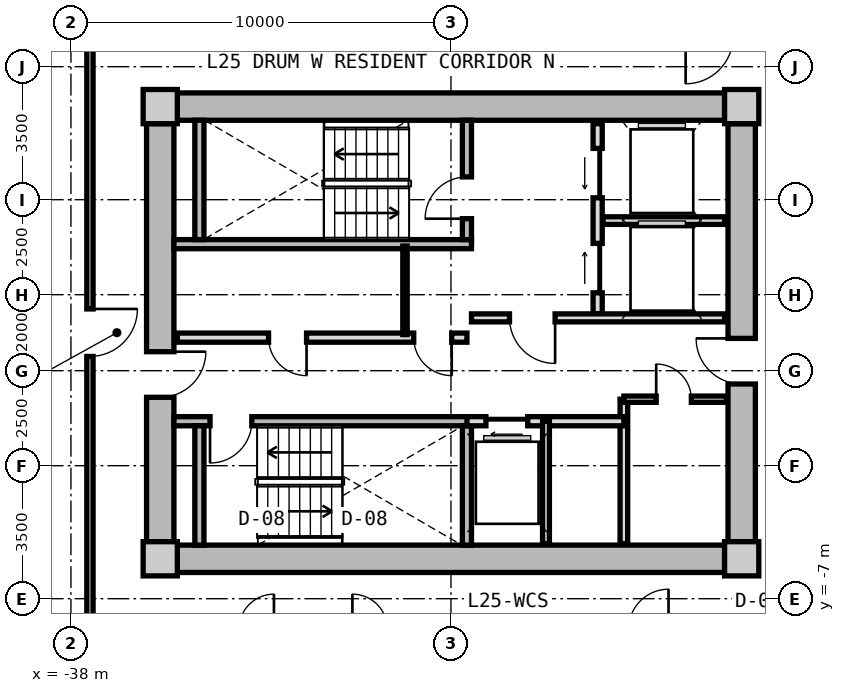
"""IFC4 building model, lengths in metres.
Left out: names, types, materials, properties, quantities, classifications, styles, units other than length and angle.
Written with IfcOpenShell. Run it as: python <this file> out.ifc"""

import sys

from ifc_helpers import new_model, si_unit, direction, frame, frame_2d, origin, origin_2d, place, context, subcontext, project, spatial, rectangle, extrude, source, transform, mapped, element, fill, save


model = new_model("IFC4")
c1 = context("Model", 3, precision=1e-05, world=origin(), true_north=direction((0.0, 1.0)))
c2 = subcontext(c1, "Body", "Model", "MODEL_VIEW")
j1 = project(units=[si_unit("LENGTHUNIT", "METRE"), si_unit("PLANEANGLEUNIT", "RADIAN")], contexts=[c1])
p1 = place(None, origin())
s1 = spatial("IfcSite", under=j1, at=p1, CompositionType="ELEMENT")
p2 = place(p1, origin())
s2 = spatial("IfcBuilding", under=s1, at=p2, CompositionType="ELEMENT")
p3 = place(p2, frame((0.0, 0.0, 84.05)))
s3 = spatial("IfcBuildingStorey", under=s2, at=p3, CompositionType="ELEMENT", Elevation=84.05)
m1 = source(origin(), c2, "Body", "SweptSolid", [
    extrude(rectangle(XDim=0.9, YDim=0.9, at=origin_2d()), origin(), (0.0, 0.0, 1.0), 3.05),
])
for number, where, z_axis, x_axis in (
    (1, (-35.65, -5.95, 0.0), (0.0, 0.0, 1.0), (1.0, 0.0, 0.0)),
    (2, (-20.35, -5.95, 0.0), (0.0, 0.0, 1.0), (1.0, 0.0, 0.0)),
    (3, (-20.35, 5.95, 0.0), (0.0, 0.0, 1.0), (1.0, 0.0, 0.0)),
    (4, (-35.65, 5.95, 0.0), (0.0, 0.0, 1.0), (1.0, 0.0, 0.0)),
):
    element("IfcColumn", number, at=place(p3, frame(where, z_axis=z_axis, x_axis=x_axis)), inside=s3, PredefinedType="COLUMN", context=c2, shape_type="MappedRepresentation", body=[
        mapped(m1, transform((0.0, 0.0, 0.0), x_axis=(1.0, 0.0, 0.0), y_axis=(0.0, 1.0, 0.0), z_axis=(0.0, 0.0, 1.0), scale=1.0)),
    ])
m2 = source(origin(), c2, "Body", "SweptSolid", [
    extrude(rectangle(XDim=14.4, YDim=0.72, at=frame_2d((7.2, 0.0))), origin(), (0.0, 0.0, 1.0), 2.79),
])
for number, where, z_axis, x_axis in (
    (5, (-35.2, 5.95, 0.0), (0.0, 0.0, 1.0), (1.0, 0.0, 0.0)),
    (6, (-20.8, -5.95, 0.0), (0.0, 0.0, 1.0), (-1.0, 0.0, 0.0)),
):
    element("IfcWall", number, at=place(p3, frame(where, z_axis=z_axis, x_axis=x_axis)), inside=s3, PredefinedType="SHEAR", context=c2, shape_type="MappedRepresentation", body=[
        mapped(m2, transform((0.0, 0.0, 0.0), x_axis=(1.0, 0.0, 0.0), y_axis=(0.0, 1.0, 0.0), z_axis=(0.0, 0.0, 1.0), scale=1.0)),
    ])
m3 = source(origin(), c2, "Body", "SweptSolid", [
    extrude(rectangle(XDim=11.0, YDim=0.72, at=frame_2d((5.5, 0.0))), origin(), (0.0, 0.0, 1.0), 2.79),
])
p4 = place(p3, frame((-35.65, -5.5, 0.0), z_axis=(0.0, 0.0, 1.0), x_axis=(0.0, 1.0, 0.0)))
e7 = element("IfcWall", 7, at=p4, inside=s3, PredefinedType="SHEAR", context=c2, shape_type="MappedRepresentation", body=[
    mapped(m3, transform((0.0, 0.0, 0.0), x_axis=(1.0, 0.0, 0.0), y_axis=(0.0, 1.0, 0.0), z_axis=(0.0, 0.0, 1.0), scale=1.0)),
])
p5 = place(p4, frame((3.8, 0.0, 0.0)))
e8 = element("IfcOpeningElement", 8, at=p5, cuts=e7, PredefinedType="OPENING", context=c2, shape_type="SweptSolid", body=[
    extrude(rectangle(XDim=1.2, YDim=2.15, at=frame_2d((0.6, 1.075))), frame((0.0, 0.37, 0.0), z_axis=(0.0, -1.0, 0.0), x_axis=(1.0, 0.0, 0.0)), (0.0, 0.0, 1.0), 0.74),
])
p6 = place(p3, frame((-20.35, 5.5, 0.0), z_axis=(0.0, 0.0, 1.0), x_axis=(0.0, -1.0, 0.0)))
e9 = element("IfcWall", 9, at=p6, inside=s3, PredefinedType="SHEAR", context=c2, shape_type="MappedRepresentation", body=[
    mapped(m3, transform((0.0, 0.0, 0.0), x_axis=(1.0, 0.0, 0.0), y_axis=(0.0, 1.0, 0.0), z_axis=(0.0, 0.0, 1.0), scale=1.0)),
])
p7 = place(p6, frame((5.65, 0.0, 0.0)))
e10 = element("IfcOpeningElement", 10, at=p7, cuts=e9, PredefinedType="OPENING", context=c2, shape_type="SweptSolid", body=[
    extrude(rectangle(XDim=1.2, YDim=2.15, at=frame_2d((0.6, 1.075))), frame((0.0, 0.37, 0.0), z_axis=(0.0, -1.0, 0.0), x_axis=(1.0, 0.0, 0.0)), (0.0, 0.0, 1.0), 0.74),
])
m4 = source(origin(), c2, "Body", "SweptSolid", [
    extrude(rectangle(XDim=7.83, YDim=0.24, at=frame_2d((3.915, 0.0))), origin(), (0.0, 0.0, 1.0), 2.79),
])
p8 = place(p3, frame((-35.29, 2.33, 0.0), z_axis=(0.0, 0.0, 1.0), x_axis=(1.0, 0.0, 0.0)))
e11 = element("IfcWall", 11, at=p8, inside=s3, PredefinedType="PARTITIONING", context=c2, shape_type="MappedRepresentation", body=[
    mapped(m4, transform((0.0, 0.0, 0.0), x_axis=(1.0, 0.0, 0.0), y_axis=(0.0, 1.0, 0.0), z_axis=(0.0, 0.0, 1.0), scale=1.0)),
])
m5 = source(origin(), c2, "Body", "SweptSolid", [
    extrude(rectangle(XDim=3.14, YDim=0.24, at=frame_2d((1.57, 0.0))), origin(), (0.0, 0.0, 1.0), 2.79),
])
p9 = place(p3, frame((-34.62, 2.45, 0.0), z_axis=(0.0, 0.0, 1.0), x_axis=(0.0, 1.0, 0.0)))
e12 = element("IfcWall", 12, at=p9, inside=s3, PredefinedType="PARTITIONING", context=c2, shape_type="MappedRepresentation", body=[
    mapped(m5, transform((0.0, 0.0, 0.0), x_axis=(1.0, 0.0, 0.0), y_axis=(0.0, 1.0, 0.0), z_axis=(0.0, 0.0, 1.0), scale=1.0)),
])
p10 = place(p3, frame((-27.58, 2.45, 0.0), z_axis=(0.0, 0.0, 1.0), x_axis=(0.0, 1.0, 0.0)))
e13 = element("IfcWall", 13, at=p10, inside=s3, PredefinedType="PARTITIONING", context=c2, shape_type="MappedRepresentation", body=[
    mapped(m5, transform((0.0, 0.0, 0.0), x_axis=(1.0, 0.0, 0.0), y_axis=(0.0, 1.0, 0.0), z_axis=(0.0, 0.0, 1.0), scale=1.0)),
])
p11 = place(p10, frame((0.55, 0.0, 0.0)))
e14 = element("IfcOpeningElement", 14, at=p11, cuts=e13, PredefinedType="OPENING", context=c2, shape_type="SweptSolid", body=[
    extrude(rectangle(XDim=1.1, YDim=2.15, at=frame_2d((0.55, 1.075))), frame((0.0, 0.13, 0.0), z_axis=(0.0, -1.0, 0.0), x_axis=(1.0, 0.0, 0.0)), (0.0, 0.0, 1.0), 0.26),
])
p12 = place(p3, frame((-35.29, -2.33, 0.0), z_axis=(0.0, 0.0, 1.0), x_axis=(1.0, 0.0, 0.0)))
e15 = element("IfcWall", 15, at=p12, inside=s3, PredefinedType="PARTITIONING", context=c2, shape_type="MappedRepresentation", body=[
    mapped(m4, transform((0.0, 0.0, 0.0), x_axis=(1.0, 0.0, 0.0), y_axis=(0.0, 1.0, 0.0), z_axis=(0.0, 0.0, 1.0), scale=1.0)),
])
p13 = place(p12, frame((0.95, 0.0, 0.0)))
e16 = element("IfcOpeningElement", 16, at=p13, cuts=e15, PredefinedType="OPENING", context=c2, shape_type="SweptSolid", body=[
    extrude(rectangle(XDim=1.1, YDim=2.15, at=frame_2d((0.55, 1.075))), frame((0.0, 0.13, 0.0), z_axis=(0.0, -1.0, 0.0), x_axis=(1.0, 0.0, 0.0)), (0.0, 0.0, 1.0), 0.26),
])
for number, where, z_axis, x_axis in (
    (17, (-34.62, -5.59, 0.0), (0.0, 0.0, 1.0), (0.0, 1.0, 0.0)),
    (18, (-27.58, -5.59, 0.0), (0.0, 0.0, 1.0), (0.0, 1.0, 0.0)),
):
    element("IfcWall", number, at=place(p3, frame(where, z_axis=z_axis, x_axis=x_axis)), inside=s3, PredefinedType="PARTITIONING", context=c2, shape_type="MappedRepresentation", body=[
        mapped(m5, transform((0.0, 0.0, 0.0), x_axis=(1.0, 0.0, 0.0), y_axis=(0.0, 1.0, 0.0), z_axis=(0.0, 0.0, 1.0), scale=1.0)),
    ])
m6 = source(origin(), c2, "Body", "SweptSolid", [
    extrude(rectangle(XDim=5.0, YDim=0.24, at=frame_2d((2.5, 0.0))), origin(), (0.0, 0.0, 1.0), 2.775),
])
p14 = place(p3, frame((-24.14, 0.5, 0.0), z_axis=(0.0, 0.0, 1.0), x_axis=(0.0, 1.0, 0.0)))
e19 = element("IfcWall", 19, at=p14, inside=s3, PredefinedType="PARTITIONING", context=c2, shape_type="MappedRepresentation", body=[
    mapped(m6, transform((0.0, 0.0, 0.0), x_axis=(1.0, 0.0, 0.0), y_axis=(0.0, 1.0, 0.0), z_axis=(0.0, 0.0, 1.0), scale=1.0)),
])
p15 = place(p14, frame((3.05, 0.0, 0.0)))
e20 = element("IfcOpeningElement", 20, at=p15, cuts=e19, PredefinedType="OPENING", context=c2, shape_type="SweptSolid", body=[
    extrude(rectangle(XDim=1.3, YDim=2.2, at=frame_2d((0.65, 1.1))), frame((0.0, 0.13, 0.0), z_axis=(0.0, -1.0, 0.0), x_axis=(1.0, 0.0, 0.0)), (0.0, 0.0, 1.0), 0.26),
])
p16 = place(p14, frame((0.55, 0.0, 0.0)))
e21 = element("IfcOpeningElement", 21, at=p16, cuts=e19, PredefinedType="OPENING", context=c2, shape_type="SweptSolid", body=[
    extrude(rectangle(XDim=1.3, YDim=2.2, at=frame_2d((0.65, 1.1))), frame((0.0, 0.13, 0.0), z_axis=(0.0, -1.0, 0.0), x_axis=(1.0, 0.0, 0.0)), (0.0, 0.0, 1.0), 0.26),
])
m7 = source(origin(), c2, "Body", "SweptSolid", [
    extrude(rectangle(XDim=3.2, YDim=0.2, at=frame_2d((1.6, 0.0))), origin(), (0.0, 0.0, 1.0), 2.775),
])
p17 = place(p3, frame((-24.0, 2.95, 0.0), z_axis=(0.0, 0.0, 1.0), x_axis=(1.0, 0.0, 0.0)))
e22 = element("IfcWall", 22, at=p17, inside=s3, PredefinedType="PARTITIONING", context=c2, shape_type="MappedRepresentation", body=[
    mapped(m7, transform((0.0, 0.0, 0.0), x_axis=(1.0, 0.0, 0.0), y_axis=(0.0, 1.0, 0.0), z_axis=(0.0, 0.0, 1.0), scale=1.0)),
])
m8 = source(origin(), c2, "Body", "SweptSolid", [
    extrude(rectangle(XDim=6.66, YDim=0.21, at=frame_2d((3.33, 0.0))), origin(), (0.0, 0.0, 1.0), 2.775),
])
p18 = place(p3, frame((-27.46, 0.39, 0.0), z_axis=(0.0, 0.0, 1.0), x_axis=(1.0, 0.0, 0.0)))
e23 = element("IfcWall", 23, at=p18, inside=s3, PredefinedType="PARTITIONING", context=c2, shape_type="MappedRepresentation", body=[
    mapped(m8, transform((0.0, 0.0, 0.0), x_axis=(1.0, 0.0, 0.0), y_axis=(0.0, 1.0, 0.0), z_axis=(0.0, 0.0, 1.0), scale=1.0)),
])
p19 = place(p18, frame((1.0, 0.0, 0.0)))
e24 = element("IfcOpeningElement", 24, at=p19, cuts=e23, PredefinedType="OPENING", context=c2, shape_type="SweptSolid", body=[
    extrude(rectangle(XDim=1.2, YDim=2.15, at=frame_2d((0.6, 1.075))), frame((0.0, 0.115, 0.0), z_axis=(0.0, -1.0, 0.0), x_axis=(1.0, 0.0, 0.0)), (0.0, 0.0, 1.0), 0.23),
])
m9 = source(origin(), c2, "Body", "SweptSolid", [
    extrude(rectangle(XDim=7.62, YDim=0.24, at=frame_2d((3.81, 0.0))), origin(), (0.0, 0.0, 1.0), 2.775),
])
p20 = place(p3, frame((-35.2, -0.13, 0.0), z_axis=(0.0, 0.0, 1.0), x_axis=(1.0, 0.0, 0.0)))
e25 = element("IfcWall", 25, at=p20, inside=s3, PredefinedType="PARTITIONING", context=c2, shape_type="MappedRepresentation", body=[
    mapped(m9, transform((0.0, 0.0, 0.0), x_axis=(1.0, 0.0, 0.0), y_axis=(0.0, 1.0, 0.0), z_axis=(0.0, 0.0, 1.0), scale=1.0)),
])
p21 = place(p20, frame((6.22, 0.0, 0.0)))
e26 = element("IfcOpeningElement", 26, at=p21, cuts=e25, PredefinedType="OPENING", context=c2, shape_type="SweptSolid", body=[
    extrude(rectangle(XDim=1.0, YDim=2.1, at=frame_2d((0.5, 1.05))), frame((0.0, 0.13, 0.0), z_axis=(0.0, -1.0, 0.0), x_axis=(1.0, 0.0, 0.0)), (0.0, 0.0, 1.0), 0.26),
])
p22 = place(p20, frame((2.4, 0.0, 0.0)))
e27 = element("IfcOpeningElement", 27, at=p22, cuts=e25, PredefinedType="OPENING", context=c2, shape_type="SweptSolid", body=[
    extrude(rectangle(XDim=1.0, YDim=2.1, at=frame_2d((0.5, 1.05))), frame((0.0, 0.13, 0.0), z_axis=(0.0, -1.0, 0.0), x_axis=(1.0, 0.0, 0.0)), (0.0, 0.0, 1.0), 0.26),
])
m10 = source(origin(), c2, "Body", "SweptSolid", [
    extrude(rectangle(XDim=2.33, YDim=0.115, at=frame_2d((1.165, 0.0))), origin(), (0.0, 0.0, 1.0), 2.775),
])
p23 = place(p3, frame((-29.21, -0.05, 0.0), z_axis=(0.0, 0.0, 1.0), x_axis=(0.0, 1.0, 0.0)))
e28 = element("IfcWall", 28, at=p23, inside=s3, PredefinedType="PARTITIONING", context=c2, shape_type="MappedRepresentation", body=[
    mapped(m10, transform((0.0, 0.0, 0.0), x_axis=(1.0, 0.0, 0.0), y_axis=(0.0, 1.0, 0.0), z_axis=(0.0, 0.0, 1.0), scale=1.0)),
])
m11 = source(origin(), c2, "Body", "SweptSolid", [
    extrude(rectangle(XDim=3.8, YDim=0.2, at=frame_2d((1.9, 0.0))), origin(), (0.0, 0.0, 1.0), 2.775),
])
p24 = place(p3, frame((-23.45, -5.55, 0.0), z_axis=(0.0, 0.0, 1.0), x_axis=(0.0, 1.0, 0.0)))
e29 = element("IfcWall", 29, at=p24, inside=s3, PredefinedType="PARTITIONING", context=c2, shape_type="MappedRepresentation", body=[
    mapped(m11, transform((0.0, 0.0, 0.0), x_axis=(1.0, 0.0, 0.0), y_axis=(0.0, 1.0, 0.0), z_axis=(0.0, 0.0, 1.0), scale=1.0)),
])
m12 = source(origin(), c2, "Body", "SweptSolid", [
    extrude(rectangle(XDim=4.13, YDim=0.24, at=frame_2d((2.065, 0.0))), origin(), (0.0, 0.0, 1.0), 2.775),
])
p25 = place(p3, frame((-27.58, -2.33, 0.0), z_axis=(0.0, 0.0, 1.0), x_axis=(1.0, 0.0, 0.0)))
e30 = element("IfcWall", 30, at=p25, inside=s3, PredefinedType="PARTITIONING", context=c2, shape_type="MappedRepresentation", body=[
    mapped(m12, transform((0.0, 0.0, 0.0), x_axis=(1.0, 0.0, 0.0), y_axis=(0.0, 1.0, 0.0), z_axis=(0.0, 0.0, 1.0), scale=1.0)),
])
p26 = place(p25, frame((0.5, 0.0, 0.0)))
e31 = element("IfcOpeningElement", 31, at=p26, cuts=e30, PredefinedType="OPENING", context=c2, shape_type="SweptSolid", body=[
    extrude(rectangle(XDim=1.1, YDim=2.2, at=frame_2d((0.55, 1.1))), frame((0.0, 0.13, 0.0), z_axis=(0.0, -1.0, 0.0), x_axis=(1.0, 0.0, 0.0)), (0.0, 0.0, 1.0), 0.26),
])
m13 = source(origin(), c2, "Body", "SweptSolid", [
    extrude(rectangle(XDim=3.22, YDim=0.18, at=frame_2d((1.61, 0.0))), origin(), (0.0, 0.0, 1.0), 2.775),
])
p27 = place(p3, frame((-25.5, -5.55, 0.0), z_axis=(0.0, 0.0, 1.0), x_axis=(0.0, 1.0, 0.0)))
e32 = element("IfcWall", 32, at=p27, inside=s3, PredefinedType="PARTITIONING", context=c2, shape_type="MappedRepresentation", body=[
    mapped(m13, transform((0.0, 0.0, 0.0), x_axis=(1.0, 0.0, 0.0), y_axis=(0.0, 1.0, 0.0), z_axis=(0.0, 0.0, 1.0), scale=1.0)),
])
m14 = source(origin(), c2, "Body", "SweptSolid", [
    extrude(rectangle(XDim=2.7, YDim=0.165, at=frame_2d((1.35, 0.0))), origin(), (0.0, 0.0, 1.0), 2.775),
])
p28 = place(p3, frame((-23.45, -1.75, 0.0), z_axis=(0.0, 0.0, 1.0), x_axis=(1.0, 0.0, 0.0)))
e33 = element("IfcWall", 33, at=p28, inside=s3, PredefinedType="PARTITIONING", context=c2, shape_type="MappedRepresentation", body=[
    mapped(m14, transform((0.0, 0.0, 0.0), x_axis=(1.0, 0.0, 0.0), y_axis=(0.0, 1.0, 0.0), z_axis=(0.0, 0.0, 1.0), scale=1.0)),
])
p29 = place(p28, frame((0.85, 0.0, 0.0)))
e34 = element("IfcOpeningElement", 34, at=p29, cuts=e33, PredefinedType="OPENING", context=c2, shape_type="SweptSolid", body=[
    extrude(rectangle(XDim=0.925, YDim=2.1, at=frame_2d((0.462, 1.05))), frame((0.0, 0.093, 0.0), z_axis=(0.0, -1.0, 0.0), x_axis=(1.0, 0.0, 0.0)), (0.0, 0.0, 1.0), 0.185),
])
m15 = source(origin(), c2, "Body", "SweptSolid", [
    extrude(rectangle(XDim=15.6, YDim=0.165, at=frame_2d((7.8, 0.0))), origin(), (0.0, 0.0, 1.0), 2.775),
])
p30 = place(p3, frame((-37.5, -7.8, 0.0), z_axis=(0.0, 0.0, 1.0), x_axis=(0.0, 1.0, 0.0)))
e35 = element("IfcWall", 35, at=p30, inside=s3, PredefinedType="PARTITIONING", context=c2, shape_type="MappedRepresentation", body=[
    mapped(m15, transform((0.0, 0.0, 0.0), x_axis=(1.0, 0.0, 0.0), y_axis=(0.0, 1.0, 0.0), z_axis=(0.0, 0.0, 1.0), scale=1.0)),
])
p31 = place(p30, frame((7.175, 0.0, 0.0)))
e36 = element("IfcOpeningElement", 36, at=p31, cuts=e35, PredefinedType="OPENING", context=c2, shape_type="SweptSolid", body=[
    extrude(rectangle(XDim=1.25, YDim=2.2, at=frame_2d((0.625, 1.1))), frame((0.0, 0.093, 0.0), z_axis=(0.0, -1.0, 0.0), x_axis=(1.0, 0.0, 0.0)), (0.0, 0.0, 1.0), 0.185),
])
m16 = source(origin(), c2, "Body", "SweptSolid", [
    extrude(rectangle(XDim=1.1, YDim=2.15, at=frame_2d((0.55, 1.075))), frame((0.0, 0.025, 0.0), z_axis=(0.0, -1.0, 0.0), x_axis=(1.0, 0.0, 0.0)), (0.0, 0.0, 1.0), 0.05),
])
p32 = place(p11, origin())
e37 = element("IfcDoor", 37, at=p32, inside=s3, OperationType="SINGLE_SWING_LEFT", PredefinedType="DOOR", context=c2, shape_type="MappedRepresentation", body=[
    mapped(m16, transform((0.0, 0.0, 0.0), x_axis=(1.0, 0.0, 0.0), y_axis=(0.0, 1.0, 0.0), z_axis=(0.0, 0.0, 1.0), scale=1.0)),
])
fill(e14, e37)
p33 = place(p13, frame((1.1, 0.0, 0.0), z_axis=(0.0, 0.0, 1.0), x_axis=(-1.0, 0.0, 0.0)))
e38 = element("IfcDoor", 38, at=p33, inside=s3, OperationType="SINGLE_SWING_RIGHT", PredefinedType="DOOR", context=c2, shape_type="MappedRepresentation", body=[
    mapped(m16, transform((0.0, 0.0, 0.0), x_axis=(1.0, 0.0, 0.0), y_axis=(0.0, 1.0, 0.0), z_axis=(0.0, 0.0, 1.0), scale=1.0)),
])
fill(e16, e38)
m17 = source(origin(), c2, "Body", "SweptSolid", [
    extrude(rectangle(XDim=1.3, YDim=2.2, at=frame_2d((0.65, 1.1))), frame((0.0, 0.025, 0.0), z_axis=(0.0, -1.0, 0.0), x_axis=(1.0, 0.0, 0.0)), (0.0, 0.0, 1.0), 0.05),
])
p34 = place(p15, origin())
e39 = element("IfcDoor", 39, at=p34, inside=s3, OperationType="SLIDING_TO_LEFT", PredefinedType="DOOR", context=c2, shape_type="MappedRepresentation", body=[
    mapped(m17, transform((0.0, 0.0, 0.0), x_axis=(1.0, 0.0, 0.0), y_axis=(0.0, 1.0, 0.0), z_axis=(0.0, 0.0, 1.0), scale=1.0)),
])
fill(e20, e39)
p35 = place(p16, origin())
e40 = element("IfcDoor", 40, at=p35, inside=s3, OperationType="SLIDING_TO_RIGHT", PredefinedType="DOOR", context=c2, shape_type="MappedRepresentation", body=[
    mapped(m17, transform((0.0, 0.0, 0.0), x_axis=(1.0, 0.0, 0.0), y_axis=(0.0, 1.0, 0.0), z_axis=(0.0, 0.0, 1.0), scale=1.0)),
])
fill(e21, e40)
m18 = source(origin(), c2, "Body", "SweptSolid", [
    extrude(rectangle(XDim=1.2, YDim=2.15, at=frame_2d((0.6, 1.075))), frame((0.0, 0.025, 0.0), z_axis=(0.0, -1.0, 0.0), x_axis=(1.0, 0.0, 0.0)), (0.0, 0.0, 1.0), 0.05),
])
p36 = place(p19, frame((1.2, 0.0, 0.0), z_axis=(0.0, 0.0, 1.0), x_axis=(-1.0, 0.0, 0.0)))
e41 = element("IfcDoor", 41, at=p36, inside=s3, OperationType="SINGLE_SWING_LEFT", PredefinedType="DOOR", context=c2, shape_type="MappedRepresentation", body=[
    mapped(m18, transform((0.0, 0.0, 0.0), x_axis=(1.0, 0.0, 0.0), y_axis=(0.0, 1.0, 0.0), z_axis=(0.0, 0.0, 1.0), scale=1.0)),
])
fill(e24, e41)
p37 = place(p5, frame((1.2, 0.0, 0.0), z_axis=(0.0, 0.0, 1.0), x_axis=(-1.0, 0.0, 0.0)))
e42 = element("IfcDoor", 42, at=p37, inside=s3, OperationType="SINGLE_SWING_LEFT", PredefinedType="DOOR", context=c2, shape_type="MappedRepresentation", body=[
    mapped(m18, transform((0.0, 0.0, 0.0), x_axis=(1.0, 0.0, 0.0), y_axis=(0.0, 1.0, 0.0), z_axis=(0.0, 0.0, 1.0), scale=1.0)),
])
fill(e8, e42)
p38 = place(p7, frame((1.2, 0.0, 0.0), z_axis=(0.0, 0.0, 1.0), x_axis=(-1.0, 0.0, 0.0)))
e43 = element("IfcDoor", 43, at=p38, inside=s3, OperationType="SINGLE_SWING_RIGHT", PredefinedType="DOOR", context=c2, shape_type="MappedRepresentation", body=[
    mapped(m18, transform((0.0, 0.0, 0.0), x_axis=(1.0, 0.0, 0.0), y_axis=(0.0, 1.0, 0.0), z_axis=(0.0, 0.0, 1.0), scale=1.0)),
])
fill(e10, e43)
m19 = source(origin(), c2, "Body", "SweptSolid", [
    extrude(rectangle(XDim=1.0, YDim=2.1, at=frame_2d((0.5, 1.05))), frame((0.0, 0.025, 0.0), z_axis=(0.0, -1.0, 0.0), x_axis=(1.0, 0.0, 0.0)), (0.0, 0.0, 1.0), 0.05),
])
p39 = place(p21, frame((1.0, 0.0, 0.0), z_axis=(0.0, 0.0, 1.0), x_axis=(-1.0, 0.0, 0.0)))
e44 = element("IfcDoor", 44, at=p39, inside=s3, OperationType="SINGLE_SWING_LEFT", PredefinedType="DOOR", context=c2, shape_type="MappedRepresentation", body=[
    mapped(m19, transform((0.0, 0.0, 0.0), x_axis=(1.0, 0.0, 0.0), y_axis=(0.0, 1.0, 0.0), z_axis=(0.0, 0.0, 1.0), scale=1.0)),
])
fill(e26, e44)
p40 = place(p22, frame((1.0, 0.0, 0.0), z_axis=(0.0, 0.0, 1.0), x_axis=(-1.0, 0.0, 0.0)))
e45 = element("IfcDoor", 45, at=p40, inside=s3, OperationType="SINGLE_SWING_LEFT", PredefinedType="DOOR", context=c2, shape_type="MappedRepresentation", body=[
    mapped(m19, transform((0.0, 0.0, 0.0), x_axis=(1.0, 0.0, 0.0), y_axis=(0.0, 1.0, 0.0), z_axis=(0.0, 0.0, 1.0), scale=1.0)),
])
fill(e27, e45)
m20 = source(origin(), c2, "Body", "SweptSolid", [
    extrude(rectangle(XDim=1.1, YDim=2.2, at=frame_2d((0.55, 1.1))), frame((0.0, 0.025, 0.0), z_axis=(0.0, -1.0, 0.0), x_axis=(1.0, 0.0, 0.0)), (0.0, 0.0, 1.0), 0.05),
])
p41 = place(p26, frame((1.1, 0.0, 0.0), z_axis=(0.0, 0.0, 1.0), x_axis=(-1.0, 0.0, 0.0)))
e46 = element("IfcDoor", 46, at=p41, inside=s3, OperationType="SLIDING_TO_LEFT", PredefinedType="DOOR", context=c2, shape_type="MappedRepresentation", body=[
    mapped(m20, transform((0.0, 0.0, 0.0), x_axis=(1.0, 0.0, 0.0), y_axis=(0.0, 1.0, 0.0), z_axis=(0.0, 0.0, 1.0), scale=1.0)),
])
fill(e31, e46)
m21 = source(origin(), c2, "Body", "SweptSolid", [
    extrude(rectangle(XDim=0.925, YDim=2.1, at=frame_2d((0.462, 1.05))), frame((0.0, 0.025, 0.0), z_axis=(0.0, -1.0, 0.0), x_axis=(1.0, 0.0, 0.0)), (0.0, 0.0, 1.0), 0.05),
])
p42 = place(p29, origin())
e47 = element("IfcDoor", 47, at=p42, inside=s3, OperationType="SINGLE_SWING_LEFT", PredefinedType="DOOR", context=c2, shape_type="MappedRepresentation", body=[
    mapped(m21, transform((0.0, 0.0, 0.0), x_axis=(1.0, 0.0, 0.0), y_axis=(0.0, 1.0, 0.0), z_axis=(0.0, 0.0, 1.0), scale=1.0)),
])
fill(e34, e47)
m22 = source(origin(), c2, "Body", "SweptSolid", [
    extrude(rectangle(XDim=1.25, YDim=2.2, at=frame_2d((0.625, 1.1))), frame((0.0, 0.025, 0.0), z_axis=(0.0, -1.0, 0.0), x_axis=(1.0, 0.0, 0.0)), (0.0, 0.0, 1.0), 0.05),
])
p43 = place(p31, frame((1.25, 0.0, 0.0), z_axis=(0.0, 0.0, 1.0), x_axis=(-1.0, 0.0, 0.0)))
e48 = element("IfcDoor", 48, at=p43, inside=s3, OperationType="SINGLE_SWING_LEFT", PredefinedType="DOOR", context=c2, shape_type="MappedRepresentation", body=[
    mapped(m22, transform((0.0, 0.0, 0.0), x_axis=(1.0, 0.0, 0.0), y_axis=(0.0, 1.0, 0.0), z_axis=(0.0, 0.0, 1.0), scale=1.0)),
])
fill(e36, e48)
save(model, sys.argv[1])
